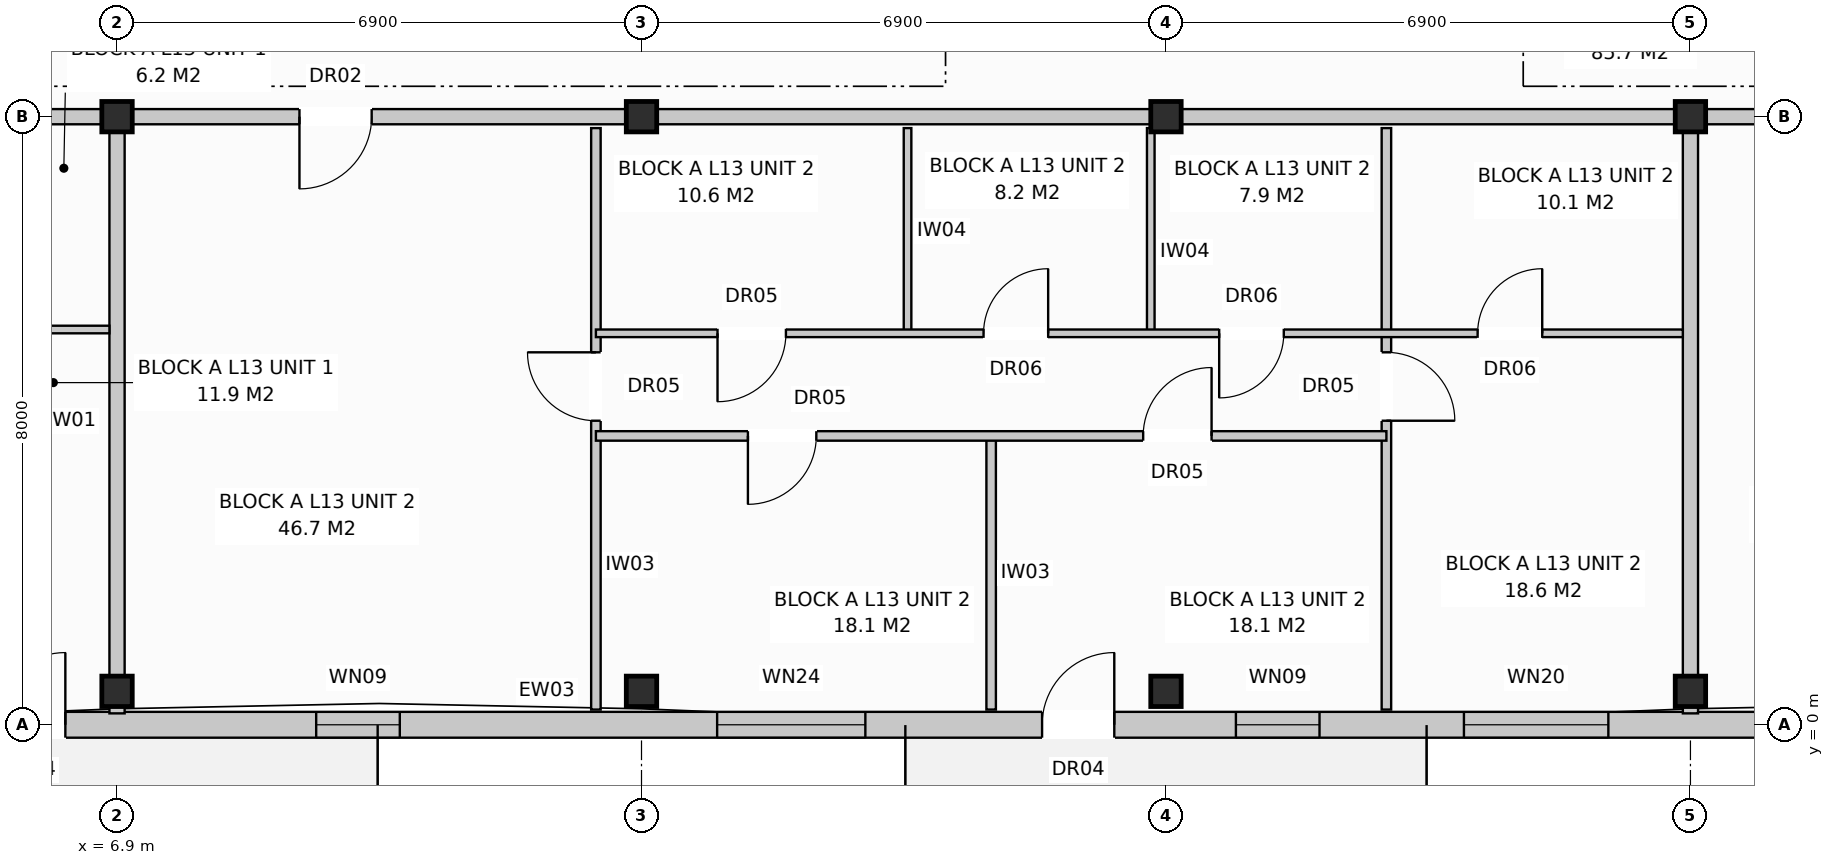
"""IFC4 building model, lengths in metres.
Left out: names, types, materials, properties, quantities, classifications, styles, units other than length and angle.
Written with IfcOpenShell. Run it as: python <this file> out.ifc"""

import sys

from ifc_helpers import new_model, si_unit, direction, frame, frame_2d, origin, origin_with_axes, origin_2d, place, context, subcontext, project, spatial, rectangle, extrude, element, fill, save


model = new_model("IFC4")
c1 = context("Model", 3, precision=1e-05, world=origin(), true_north=direction((0.0, 1.0)))
c2 = subcontext(c1, "Body", "Model", "MODEL_VIEW")
j1 = project(units=[si_unit("LENGTHUNIT", "METRE"), si_unit("PLANEANGLEUNIT", "RADIAN")], contexts=[c1])
p1 = place(None, origin())
s1 = spatial("IfcSite", under=j1, at=p1, CompositionType="ELEMENT")
p2 = place(p1, origin())
s2 = spatial("IfcBuilding", under=s1, at=p2, CompositionType="ELEMENT")
p3 = place(p2, frame((0.0, 0.0, 43.2)))
s3 = spatial("IfcBuildingStorey", under=s2, at=p3, CompositionType="ELEMENT", Elevation=43.2)
for number, where, z_axis, x_axis in (
    (1, (6.9, 0.44, 0.0), (0.0, 0.0, 1.0), (1.0, 0.0, 0.0)),
    (2, (6.9, 8.0, 0.0), (0.0, 0.0, 1.0), (1.0, 0.0, 0.0)),
    (3, (13.8, 0.44, 0.0), (0.0, 0.0, 1.0), (1.0, 0.0, 0.0)),
    (4, (13.8, 8.0, 0.0), (0.0, 0.0, 1.0), (1.0, 0.0, 0.0)),
    (5, (20.7, 0.44, 0.0), (0.0, 0.0, 1.0), (1.0, 0.0, 0.0)),
    (6, (20.7, 8.0, 0.0), (0.0, 0.0, 1.0), (1.0, 0.0, 0.0)),
    (7, (27.6, 0.44, 0.0), (0.0, 0.0, 1.0), (1.0, 0.0, 0.0)),
    (8, (27.6, 8.0, 0.0), (0.0, 0.0, 1.0), (1.0, 0.0, 0.0)),
):
    element("IfcColumn", number, at=place(p3, frame(where, z_axis=z_axis, x_axis=x_axis)), inside=s3, PredefinedType="COLUMN", context=c2, shape_type="SweptSolid", body=[
        extrude(rectangle(XDim=0.4, YDim=0.4, at=origin_2d()), origin(), (0.0, 0.0, 1.0), 3.2),
    ])
p4 = place(p3, frame((0.16, 0.0, 0.0), z_axis=(0.0, 0.0, 1.0), x_axis=(1.0, 0.0, 0.0)))
e9 = element("IfcWall", 9, at=p4, inside=s3, PredefinedType="STANDARD", context=c2, shape_type="SweptSolid", body=[
    extrude(rectangle(XDim=41.08, YDim=0.34, at=frame_2d((20.54, 0.0))), origin(), (0.0, 0.0, 1.0), 2.97),
])
p5 = place(p4, frame((5.11, 0.0, 0.0)))
e10 = element("IfcOpeningElement", 10, at=p5, cuts=e9, PredefinedType="OPENING", context=c2, shape_type="SweptSolid", body=[
    extrude(rectangle(XDim=0.95, YDim=2.1, at=frame_2d((0.475, 1.05))), frame((0.0, 0.182, 0.0), z_axis=(0.0, -1.0, 0.0), x_axis=(1.0, 0.0, 0.0)), (0.0, 0.0, 1.0), 0.364),
])
p6 = place(p4, frame((18.91, 0.0, 0.0)))
e11 = element("IfcOpeningElement", 11, at=p6, cuts=e9, PredefinedType="OPENING", context=c2, shape_type="SweptSolid", body=[
    extrude(rectangle(XDim=0.95, YDim=2.1, at=frame_2d((0.475, 1.05))), frame((0.0, 0.182, 0.0), z_axis=(0.0, -1.0, 0.0), x_axis=(1.0, 0.0, 0.0)), (0.0, 0.0, 1.0), 0.364),
])
p7 = place(p4, frame((31.431, 0.0, 0.0)))
e12 = element("IfcOpeningElement", 12, at=p7, cuts=e9, PredefinedType="OPENING", context=c2, shape_type="SweptSolid", body=[
    extrude(rectangle(XDim=0.95, YDim=2.1, at=frame_2d((0.475, 1.05))), frame((0.0, 0.182, 0.0), z_axis=(0.0, -1.0, 0.0), x_axis=(1.0, 0.0, 0.0)), (0.0, 0.0, 1.0), 0.364),
])
p8 = place(p4, frame((1.11, 0.0, 0.8)))
e13 = element("IfcOpeningElement", 13, at=p8, cuts=e9, PredefinedType="OPENING", context=c2, shape_type="SweptSolid", body=[
    extrude(rectangle(XDim=1.8, YDim=1.7, at=frame_2d((0.9, 0.85))), frame((0.0, 0.182, 0.0), z_axis=(0.0, -1.0, 0.0), x_axis=(1.0, 0.0, 0.0)), (0.0, 0.0, 1.0), 0.364),
])
p9 = place(p4, frame((9.36, 0.0, 0.72)))
e14 = element("IfcOpeningElement", 14, at=p9, cuts=e9, PredefinedType="OPENING", context=c2, shape_type="SweptSolid", body=[
    extrude(rectangle(XDim=1.1, YDim=1.5, at=frame_2d((0.55, 0.75))), frame((0.0, 0.182, 0.0), z_axis=(0.0, -1.0, 0.0), x_axis=(1.0, 0.0, 0.0)), (0.0, 0.0, 1.0), 0.364),
])
p10 = place(p4, frame((14.635, 0.0, 0.8)))
e15 = element("IfcOpeningElement", 15, at=p10, cuts=e9, PredefinedType="OPENING", context=c2, shape_type="SweptSolid", body=[
    extrude(rectangle(XDim=1.95, YDim=1.65, at=frame_2d((0.975, 0.825))), frame((0.0, 0.182, 0.0), z_axis=(0.0, -1.0, 0.0), x_axis=(1.0, 0.0, 0.0)), (0.0, 0.0, 1.0), 0.364),
])
p11 = place(p4, frame((21.46, 0.0, 0.72)))
e16 = element("IfcOpeningElement", 16, at=p11, cuts=e9, PredefinedType="OPENING", context=c2, shape_type="SweptSolid", body=[
    extrude(rectangle(XDim=1.1, YDim=1.5, at=frame_2d((0.55, 0.75))), frame((0.0, 0.182, 0.0), z_axis=(0.0, -1.0, 0.0), x_axis=(1.0, 0.0, 0.0)), (0.0, 0.0, 1.0), 0.364),
])
p12 = place(p4, frame((24.46, 0.0, 0.8)))
e17 = element("IfcOpeningElement", 17, at=p12, cuts=e9, PredefinedType="OPENING", context=c2, shape_type="SweptSolid", body=[
    extrude(rectangle(XDim=1.9, YDim=1.85, at=frame_2d((0.95, 0.925))), frame((0.0, 0.182, 0.0), z_axis=(0.0, -1.0, 0.0), x_axis=(1.0, 0.0, 0.0)), (0.0, 0.0, 1.0), 0.364),
])
p13 = place(p4, frame((29.135, 0.0, 0.8)))
e18 = element("IfcOpeningElement", 18, at=p13, cuts=e9, PredefinedType="OPENING", context=c2, shape_type="SweptSolid", body=[
    extrude(rectangle(XDim=1.95, YDim=1.65, at=frame_2d((0.975, 0.825))), frame((0.0, 0.182, 0.0), z_axis=(0.0, -1.0, 0.0), x_axis=(1.0, 0.0, 0.0)), (0.0, 0.0, 1.0), 0.364),
])
p14 = place(p4, frame((35.26, 0.0, 0.72)))
e19 = element("IfcOpeningElement", 19, at=p14, cuts=e9, PredefinedType="OPENING", context=c2, shape_type="SweptSolid", body=[
    extrude(rectangle(XDim=1.1, YDim=1.5, at=frame_2d((0.55, 0.75))), frame((0.0, 0.182, 0.0), z_axis=(0.0, -1.0, 0.0), x_axis=(1.0, 0.0, 0.0)), (0.0, 0.0, 1.0), 0.364),
])
p15 = place(p4, frame((38.06, 0.0, 0.8)))
e20 = element("IfcOpeningElement", 20, at=p15, cuts=e9, PredefinedType="OPENING", context=c2, shape_type="SweptSolid", body=[
    extrude(rectangle(XDim=1.9, YDim=1.85, at=frame_2d((0.95, 0.925))), frame((0.0, 0.182, 0.0), z_axis=(0.0, -1.0, 0.0), x_axis=(1.0, 0.0, 0.0)), (0.0, 0.0, 1.0), 0.364),
])
p16 = place(p3, frame((6.9, 7.85, 0.0), z_axis=(0.0, 0.0, 1.0), x_axis=(0.0, -1.0, 0.0)))
e21 = element("IfcWall", 21, at=p16, inside=s3, PredefinedType="PARTITIONING", context=c2, shape_type="SweptSolid", body=[
    extrude(rectangle(XDim=7.7, YDim=0.2, at=frame_2d((3.85, 0.0))), origin(), (0.0, 0.0, 1.0), 2.41),
])
p17 = place(p3, frame((0.0, 8.0, 0.0), z_axis=(0.0, 0.0, 1.0), x_axis=(1.0, 0.0, 0.0)))
e22 = element("IfcWall", 22, at=p17, inside=s3, PredefinedType="PARTITIONING", context=c2, shape_type="SweptSolid", body=[
    extrude(rectangle(XDim=6.9, YDim=0.2, at=frame_2d((3.45, 0.0))), origin(), (0.0, 0.0, 1.0), 2.41),
])
p18 = place(p17, frame((2.0, 0.0, 0.0)))
e23 = element("IfcOpeningElement", 23, at=p18, cuts=e22, PredefinedType="OPENING", context=c2, shape_type="SweptSolid", body=[
    extrude(rectangle(XDim=0.95, YDim=2.15, at=frame_2d((0.475, 1.075))), frame((0.0, 0.112, 0.0), z_axis=(0.0, -1.0, 0.0), x_axis=(1.0, 0.0, 0.0)), (0.0, 0.0, 1.0), 0.224),
])
p19 = place(p3, frame((4.3, 5.2, 0.0), z_axis=(0.0, 0.0, 1.0), x_axis=(1.0, 0.0, 0.0)))
e24 = element("IfcWall", 24, at=p19, inside=s3, PredefinedType="PARTITIONING", context=c2, shape_type="SweptSolid", body=[
    extrude(rectangle(XDim=2.5, YDim=0.1, at=frame_2d((1.25, 0.0))), origin(), (0.0, 0.0, 1.0), 2.97),
])
p20 = place(p3, frame((27.6, 7.85, 0.0), z_axis=(0.0, 0.0, 1.0), x_axis=(0.0, -1.0, 0.0)))
e25 = element("IfcWall", 25, at=p20, inside=s3, PredefinedType="PARTITIONING", context=c2, shape_type="SweptSolid", body=[
    extrude(rectangle(XDim=7.7, YDim=0.2, at=frame_2d((3.85, 0.0))), origin(), (0.0, 0.0, 1.0), 2.97),
])
p21 = place(p3, frame((6.9, 8.0, 0.0), z_axis=(0.0, 0.0, 1.0), x_axis=(1.0, 0.0, 0.0)))
e26 = element("IfcWall", 26, at=p21, inside=s3, PredefinedType="PARTITIONING", context=c2, shape_type="SweptSolid", body=[
    extrude(rectangle(XDim=20.7, YDim=0.2, at=frame_2d((10.35, 0.0))), origin(), (0.0, 0.0, 1.0), 2.41),
])
p22 = place(p21, frame((2.4, 0.0, 0.0)))
e27 = element("IfcOpeningElement", 27, at=p22, cuts=e26, PredefinedType="OPENING", context=c2, shape_type="SweptSolid", body=[
    extrude(rectangle(XDim=0.95, YDim=2.15, at=frame_2d((0.475, 1.075))), frame((0.0, 0.112, 0.0), z_axis=(0.0, -1.0, 0.0), x_axis=(1.0, 0.0, 0.0)), (0.0, 0.0, 1.0), 0.224),
])
p23 = place(p3, frame((13.2, 7.85, 0.0), z_axis=(0.0, 0.0, 1.0), x_axis=(0.0, -1.0, 0.0)))
e28 = element("IfcWall", 28, at=p23, inside=s3, PredefinedType="PARTITIONING", context=c2, shape_type="SweptSolid", body=[
    extrude(rectangle(XDim=7.65, YDim=0.125, at=frame_2d((3.825, 0.0))), origin(), (0.0, 0.0, 1.0), 2.97),
])
p24 = place(p23, frame((2.95, 0.0, 0.0)))
e29 = element("IfcOpeningElement", 29, at=p24, cuts=e28, PredefinedType="OPENING", context=c2, shape_type="SweptSolid", body=[
    extrude(rectangle(XDim=0.9, YDim=2.1, at=frame_2d((0.45, 1.05))), frame((0.0, 0.074, 0.0), z_axis=(0.0, -1.0, 0.0), x_axis=(1.0, 0.0, 0.0)), (0.0, 0.0, 1.0), 0.149),
])
for number, where, z_axis, x_axis in (
    (30, (17.3, 7.85, 0.0), (0.0, 0.0, 1.0), (0.0, -1.0, 0.0)),
    (31, (20.5, 7.85, 0.0), (0.0, 0.0, 1.0), (0.0, -1.0, 0.0)),
):
    element("IfcWall", number, at=place(p3, frame(where, z_axis=z_axis, x_axis=x_axis)), inside=s3, PredefinedType="PARTITIONING", context=c2, shape_type="SweptSolid", body=[
        extrude(rectangle(XDim=2.7, YDim=0.1, at=frame_2d((1.35, 0.0))), origin(), (0.0, 0.0, 1.0), 2.97),
    ])
p25 = place(p3, frame((18.4, 3.8, 0.0), z_axis=(0.0, 0.0, 1.0), x_axis=(0.0, -1.0, 0.0)))
e32 = element("IfcWall", 32, at=p25, inside=s3, PredefinedType="PARTITIONING", context=c2, shape_type="SweptSolid", body=[
    extrude(rectangle(XDim=3.6, YDim=0.125, at=frame_2d((1.8, 0.0))), origin(), (0.0, 0.0, 1.0), 2.59),
])
p26 = place(p3, frame((23.6, 7.85, 0.0), z_axis=(0.0, 0.0, 1.0), x_axis=(0.0, -1.0, 0.0)))
e33 = element("IfcWall", 33, at=p26, inside=s3, PredefinedType="PARTITIONING", context=c2, shape_type="SweptSolid", body=[
    extrude(rectangle(XDim=7.65, YDim=0.125, at=frame_2d((3.825, 0.0))), origin(), (0.0, 0.0, 1.0), 2.97),
])
p27 = place(p26, frame((2.95, 0.0, 0.0)))
e34 = element("IfcOpeningElement", 34, at=p27, cuts=e33, PredefinedType="OPENING", context=c2, shape_type="SweptSolid", body=[
    extrude(rectangle(XDim=0.9, YDim=2.1, at=frame_2d((0.45, 1.05))), frame((0.0, 0.074, 0.0), z_axis=(0.0, -1.0, 0.0), x_axis=(1.0, 0.0, 0.0)), (0.0, 0.0, 1.0), 0.149),
])
p28 = place(p3, frame((13.2, 5.15, 0.0), z_axis=(0.0, 0.0, 1.0), x_axis=(1.0, 0.0, 0.0)))
e35 = element("IfcWall", 35, at=p28, inside=s3, PredefinedType="PARTITIONING", context=c2, shape_type="SweptSolid", body=[
    extrude(rectangle(XDim=14.3, YDim=0.1, at=frame_2d((7.15, 0.0))), origin(), (0.0, 0.0, 1.0), 2.97),
])
p29 = place(p28, frame((1.6, 0.0, 0.0)))
e36 = element("IfcOpeningElement", 36, at=p29, cuts=e35, PredefinedType="OPENING", context=c2, shape_type="SweptSolid", body=[
    extrude(rectangle(XDim=0.9, YDim=2.1, at=frame_2d((0.45, 1.05))), frame((0.0, 0.062, 0.0), z_axis=(0.0, -1.0, 0.0), x_axis=(1.0, 0.0, 0.0)), (0.0, 0.0, 1.0), 0.124),
])
p30 = place(p28, frame((5.1, 0.0, 0.0)))
e37 = element("IfcOpeningElement", 37, at=p30, cuts=e35, PredefinedType="OPENING", context=c2, shape_type="SweptSolid", body=[
    extrude(rectangle(XDim=0.85, YDim=2.05, at=frame_2d((0.425, 1.025))), frame((0.0, 0.062, 0.0), z_axis=(0.0, -1.0, 0.0), x_axis=(1.0, 0.0, 0.0)), (0.0, 0.0, 1.0), 0.124),
])
p31 = place(p28, frame((8.2, 0.0, 0.0)))
e38 = element("IfcOpeningElement", 38, at=p31, cuts=e35, PredefinedType="OPENING", context=c2, shape_type="SweptSolid", body=[
    extrude(rectangle(XDim=0.85, YDim=2.05, at=frame_2d((0.425, 1.025))), frame((0.0, 0.062, 0.0), z_axis=(0.0, -1.0, 0.0), x_axis=(1.0, 0.0, 0.0)), (0.0, 0.0, 1.0), 0.124),
])
p32 = place(p28, frame((11.6, 0.0, 0.0)))
e39 = element("IfcOpeningElement", 39, at=p32, cuts=e35, PredefinedType="OPENING", context=c2, shape_type="SweptSolid", body=[
    extrude(rectangle(XDim=0.85, YDim=2.05, at=frame_2d((0.425, 1.025))), frame((0.0, 0.062, 0.0), z_axis=(0.0, -1.0, 0.0), x_axis=(1.0, 0.0, 0.0)), (0.0, 0.0, 1.0), 0.124),
])
p33 = place(p3, frame((13.2, 3.8, 0.0), z_axis=(0.0, 0.0, 1.0), x_axis=(1.0, 0.0, 0.0)))
e40 = element("IfcWall", 40, at=p33, inside=s3, PredefinedType="PARTITIONING", context=c2, shape_type="SweptSolid", body=[
    extrude(rectangle(XDim=10.4, YDim=0.125, at=frame_2d((5.2, 0.0))), origin(), (0.0, 0.0, 1.0), 2.97),
])
p34 = place(p33, frame((2.0, 0.0, 0.0)))
e41 = element("IfcOpeningElement", 41, at=p34, cuts=e40, PredefinedType="OPENING", context=c2, shape_type="SweptSolid", body=[
    extrude(rectangle(XDim=0.9, YDim=2.1, at=frame_2d((0.45, 1.05))), frame((0.0, 0.074, 0.0), z_axis=(0.0, -1.0, 0.0), x_axis=(1.0, 0.0, 0.0)), (0.0, 0.0, 1.0), 0.149),
])
p35 = place(p33, frame((7.2, 0.0, 0.0)))
e42 = element("IfcOpeningElement", 42, at=p35, cuts=e40, PredefinedType="OPENING", context=c2, shape_type="SweptSolid", body=[
    extrude(rectangle(XDim=0.9, YDim=2.1, at=frame_2d((0.45, 1.05))), frame((0.0, 0.074, 0.0), z_axis=(0.0, -1.0, 0.0), x_axis=(1.0, 0.0, 0.0)), (0.0, 0.0, 1.0), 0.149),
])
p36 = place(p3, frame((27.6, 8.0, 0.0), z_axis=(0.0, 0.0, 1.0), x_axis=(1.0, 0.0, 0.0)))
e43 = element("IfcWall", 43, at=p36, inside=s3, PredefinedType="PARTITIONING", context=c2, shape_type="SweptSolid", body=[
    extrude(rectangle(XDim=13.8, YDim=0.2, at=frame_2d((6.9, 0.0))), origin(), (0.0, 0.0, 1.0), 2.41),
])
p37 = place(p36, frame((2.4, 0.0, 0.0)))
e44 = element("IfcOpeningElement", 44, at=p37, cuts=e43, PredefinedType="OPENING", context=c2, shape_type="SweptSolid", body=[
    extrude(rectangle(XDim=0.95, YDim=2.15, at=frame_2d((0.475, 1.075))), frame((0.0, 0.112, 0.0), z_axis=(0.0, -1.0, 0.0), x_axis=(1.0, 0.0, 0.0)), (0.0, 0.0, 1.0), 0.224),
])
p38 = place(p5, origin_with_axes())
e45 = element("IfcDoor", 45, at=p38, inside=s3, OperationType="SINGLE_SWING_RIGHT", PredefinedType="DOOR", context=c2, shape_type="SweptSolid", body=[
    extrude(rectangle(XDim=0.95, YDim=2.1, at=frame_2d((0.475, 1.05))), frame((0.0, 0.025, 0.0), z_axis=(0.0, -1.0, 0.0), x_axis=(1.0, 0.0, 0.0)), (0.0, 0.0, 1.0), 0.05),
])
fill(e10, e45)
p39 = place(p6, origin_with_axes())
e46 = element("IfcDoor", 46, at=p39, inside=s3, OperationType="SINGLE_SWING_RIGHT", PredefinedType="DOOR", context=c2, shape_type="SweptSolid", body=[
    extrude(rectangle(XDim=0.95, YDim=2.1, at=frame_2d((0.475, 1.05))), frame((0.0, 0.025, 0.0), z_axis=(0.0, -1.0, 0.0), x_axis=(1.0, 0.0, 0.0)), (0.0, 0.0, 1.0), 0.05),
])
fill(e11, e46)
p40 = place(p9, origin_with_axes())
e47 = element("IfcWindow", 47, at=p40, inside=s3, PartitioningType="SINGLE_PANEL", PredefinedType="WINDOW", context=c2, shape_type="SweptSolid", body=[
    extrude(rectangle(XDim=1.1, YDim=1.5, at=frame_2d((0.55, 0.75))), frame((0.0, 0.03, 0.0), z_axis=(0.0, -1.0, 0.0), x_axis=(1.0, 0.0, 0.0)), (0.0, 0.0, 1.0), 0.06),
])
fill(e14, e47)
p41 = place(p10, origin_with_axes())
e48 = element("IfcWindow", 48, at=p41, inside=s3, PartitioningType="SINGLE_PANEL", PredefinedType="WINDOW", context=c2, shape_type="SweptSolid", body=[
    extrude(rectangle(XDim=1.95, YDim=1.65, at=frame_2d((0.975, 0.825))), frame((0.0, 0.03, 0.0), z_axis=(0.0, -1.0, 0.0), x_axis=(1.0, 0.0, 0.0)), (0.0, 0.0, 1.0), 0.06),
])
fill(e15, e48)
p42 = place(p11, origin_with_axes())
e49 = element("IfcWindow", 49, at=p42, inside=s3, PartitioningType="SINGLE_PANEL", PredefinedType="WINDOW", context=c2, shape_type="SweptSolid", body=[
    extrude(rectangle(XDim=1.1, YDim=1.5, at=frame_2d((0.55, 0.75))), frame((0.0, 0.03, 0.0), z_axis=(0.0, -1.0, 0.0), x_axis=(1.0, 0.0, 0.0)), (0.0, 0.0, 1.0), 0.06),
])
fill(e16, e49)
p43 = place(p12, origin_with_axes())
e50 = element("IfcWindow", 50, at=p43, inside=s3, PartitioningType="SINGLE_PANEL", PredefinedType="WINDOW", context=c2, shape_type="SweptSolid", body=[
    extrude(rectangle(XDim=1.9, YDim=1.85, at=frame_2d((0.95, 0.925))), frame((0.0, 0.03, 0.0), z_axis=(0.0, -1.0, 0.0), x_axis=(1.0, 0.0, 0.0)), (0.0, 0.0, 1.0), 0.06),
])
fill(e17, e50)
p44 = place(p22, frame((0.95, 0.0, 0.0), z_axis=(0.0, 0.0, 1.0), x_axis=(-1.0, 0.0, 0.0)))
e51 = element("IfcDoor", 51, at=p44, inside=s3, OperationType="SINGLE_SWING_LEFT", PredefinedType="DOOR", context=c2, shape_type="SweptSolid", body=[
    extrude(rectangle(XDim=0.95, YDim=2.15, at=frame_2d((0.475, 1.075))), frame((0.0, 0.025, 0.0), z_axis=(0.0, -1.0, 0.0), x_axis=(1.0, 0.0, 0.0)), (0.0, 0.0, 1.0), 0.05),
])
fill(e27, e51)
p45 = place(p24, frame((0.9, 0.0, 0.0), z_axis=(0.0, 0.0, 1.0), x_axis=(-1.0, 0.0, 0.0)))
e52 = element("IfcDoor", 52, at=p45, inside=s3, OperationType="SINGLE_SWING_LEFT", PredefinedType="DOOR", context=c2, shape_type="SweptSolid", body=[
    extrude(rectangle(XDim=0.9, YDim=2.1, at=frame_2d((0.45, 1.05))), frame((0.0, 0.025, 0.0), z_axis=(0.0, -1.0, 0.0), x_axis=(1.0, 0.0, 0.0)), (0.0, 0.0, 1.0), 0.05),
])
fill(e29, e52)
p46 = place(p27, origin_with_axes())
e53 = element("IfcDoor", 53, at=p46, inside=s3, OperationType="SINGLE_SWING_RIGHT", PredefinedType="DOOR", context=c2, shape_type="SweptSolid", body=[
    extrude(rectangle(XDim=0.9, YDim=2.1, at=frame_2d((0.45, 1.05))), frame((0.0, 0.025, 0.0), z_axis=(0.0, -1.0, 0.0), x_axis=(1.0, 0.0, 0.0)), (0.0, 0.0, 1.0), 0.05),
])
fill(e34, e53)
p47 = place(p29, frame((0.9, 0.0, 0.0), z_axis=(0.0, 0.0, 1.0), x_axis=(-1.0, 0.0, 0.0)))
e54 = element("IfcDoor", 54, at=p47, inside=s3, OperationType="SINGLE_SWING_LEFT", PredefinedType="DOOR", context=c2, shape_type="SweptSolid", body=[
    extrude(rectangle(XDim=0.9, YDim=2.1, at=frame_2d((0.45, 1.05))), frame((0.0, 0.025, 0.0), z_axis=(0.0, -1.0, 0.0), x_axis=(1.0, 0.0, 0.0)), (0.0, 0.0, 1.0), 0.05),
])
fill(e36, e54)
p48 = place(p30, origin_with_axes())
e55 = element("IfcDoor", 55, at=p48, inside=s3, OperationType="SINGLE_SWING_RIGHT", PredefinedType="DOOR", context=c2, shape_type="SweptSolid", body=[
    extrude(rectangle(XDim=0.85, YDim=2.05, at=frame_2d((0.425, 1.025))), frame((0.0, 0.025, 0.0), z_axis=(0.0, -1.0, 0.0), x_axis=(1.0, 0.0, 0.0)), (0.0, 0.0, 1.0), 0.05),
])
fill(e37, e55)
p49 = place(p31, frame((0.85, 0.0, 0.0), z_axis=(0.0, 0.0, 1.0), x_axis=(-1.0, 0.0, 0.0)))
e56 = element("IfcDoor", 56, at=p49, inside=s3, OperationType="SINGLE_SWING_LEFT", PredefinedType="DOOR", context=c2, shape_type="SweptSolid", body=[
    extrude(rectangle(XDim=0.85, YDim=2.05, at=frame_2d((0.425, 1.025))), frame((0.0, 0.025, 0.0), z_axis=(0.0, -1.0, 0.0), x_axis=(1.0, 0.0, 0.0)), (0.0, 0.0, 1.0), 0.05),
])
fill(e38, e56)
p50 = place(p32, origin_with_axes())
e57 = element("IfcDoor", 57, at=p50, inside=s3, OperationType="SINGLE_SWING_RIGHT", PredefinedType="DOOR", context=c2, shape_type="SweptSolid", body=[
    extrude(rectangle(XDim=0.85, YDim=2.05, at=frame_2d((0.425, 1.025))), frame((0.0, 0.025, 0.0), z_axis=(0.0, -1.0, 0.0), x_axis=(1.0, 0.0, 0.0)), (0.0, 0.0, 1.0), 0.05),
])
fill(e39, e57)
p51 = place(p34, frame((0.9, 0.0, 0.0), z_axis=(0.0, 0.0, 1.0), x_axis=(-1.0, 0.0, 0.0)))
e58 = element("IfcDoor", 58, at=p51, inside=s3, OperationType="SINGLE_SWING_LEFT", PredefinedType="DOOR", context=c2, shape_type="SweptSolid", body=[
    extrude(rectangle(XDim=0.9, YDim=2.1, at=frame_2d((0.45, 1.05))), frame((0.0, 0.025, 0.0), z_axis=(0.0, -1.0, 0.0), x_axis=(1.0, 0.0, 0.0)), (0.0, 0.0, 1.0), 0.05),
])
fill(e41, e58)
p52 = place(p35, origin_with_axes())
e59 = element("IfcDoor", 59, at=p52, inside=s3, OperationType="SINGLE_SWING_RIGHT", PredefinedType="DOOR", context=c2, shape_type="SweptSolid", body=[
    extrude(rectangle(XDim=0.9, YDim=2.1, at=frame_2d((0.45, 1.05))), frame((0.0, 0.025, 0.0), z_axis=(0.0, -1.0, 0.0), x_axis=(1.0, 0.0, 0.0)), (0.0, 0.0, 1.0), 0.05),
])
fill(e42, e59)
save(model, sys.argv[1])
